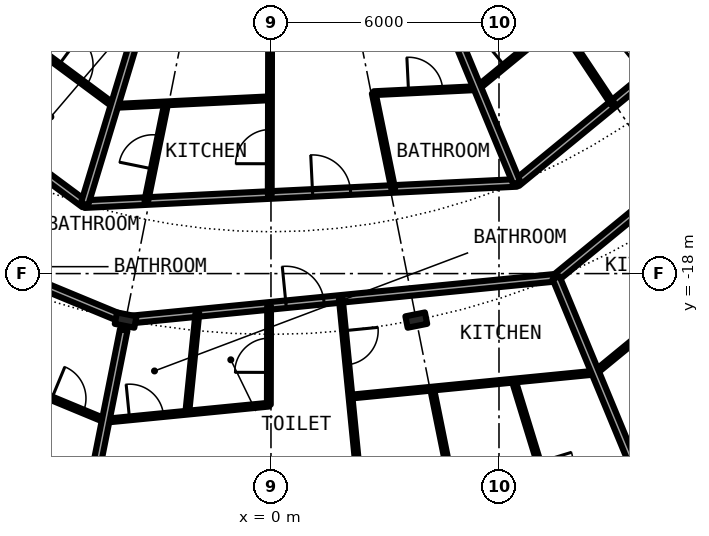
"""IFC4 building model, lengths in metres.
Left out: names, types, materials, properties, quantities, classifications, styles, units other than length and angle.
Written with IfcOpenShell. Run it as: python <this file> out.ifc"""

import sys

from ifc_helpers import new_model, si_unit, direction, frame, frame_2d, origin, origin_2d, place, context, subcontext, project, spatial, rectangle, i_section, extrude, element, fill, save


model = new_model("IFC4")
c1 = context("Model", 3, precision=1e-05, world=origin(), true_north=direction((0.0, 1.0)))
c2 = subcontext(c1, "Body", "Model", "MODEL_VIEW")
j1 = project(units=[si_unit("LENGTHUNIT", "METRE"), si_unit("PLANEANGLEUNIT", "RADIAN")], contexts=[c1])
p1 = place(None, origin())
s1 = spatial("IfcSite", under=j1, at=p1, CompositionType="ELEMENT")
p2 = place(p1, origin())
s2 = spatial("IfcBuilding", under=s1, at=p2, CompositionType="ELEMENT")
p3 = place(p2, frame((0.0, 0.0, 63.6)))
s3 = spatial("IfcBuildingStorey", under=s2, at=p3, CompositionType="ELEMENT", Elevation=63.6)
for number, where, z_axis, x_axis in (
    (1, (-3.824, -19.223, 0.0), (0.0, 0.0, 1.0), (-0.195, -0.981, 0.0)),
    (2, (3.824, -19.223, 0.0), (0.0, 0.0, 1.0), (0.195, -0.981, 0.0)),
):
    element("IfcColumn", number, at=place(p3, frame(where, z_axis=z_axis, x_axis=x_axis)), inside=s3, PredefinedType="COLUMN", context=c2, shape_type="SweptSolid", body=[
        extrude(i_section(OverallWidth=0.306, OverallDepth=0.524, WebThickness=0.021, FlangeThickness=0.04, FilletRadius=0.027, at=origin_2d()), origin(), (0.0, 0.0, 1.0), 3.05),
    ])
p4 = place(p3, frame((-8.376, -20.204, 0.0), z_axis=(0.0, 0.0, 1.0), x_axis=(0.92378218199, -0.382918372814, 0.0)))
e3 = element("IfcWall", 3, at=p4, inside=s3, PredefinedType="PARTITIONING", context=c2, shape_type="SweptSolid", body=[
    extrude(rectangle(XDim=4.364, YDim=0.1, at=frame_2d((2.182, 0.0))), origin(), (0.0, 0.0, 1.0), 2.7),
])
p5 = place(p4, frame((2.823, 0.0, 0.0)))
e4 = element("IfcOpeningElement", 4, at=p5, cuts=e3, PredefinedType="OPENING", context=c2, shape_type="SweptSolid", body=[
    extrude(rectangle(XDim=0.9, YDim=2.3, at=frame_2d((0.45, 1.15))), frame((0.0, 0.06, 0.0), z_axis=(0.0, -1.0, 0.0), x_axis=(1.0, 0.0, 0.0)), (0.0, 0.0, 1.0), 0.12),
])
p6 = place(p3, frame((-4.36, -21.872, 0.0), z_axis=(0.0, 0.0, 1.0), x_axis=(0.995203449084, 0.097826862012, 0.0)))
e5 = element("IfcWall", 5, at=p6, inside=s3, PredefinedType="PARTITIONING", context=c2, shape_type="SweptSolid", body=[
    extrude(rectangle(XDim=4.325, YDim=0.1, at=frame_2d((2.163, 0.0))), origin(), (0.0, 0.0, 1.0), 2.7),
])
p7 = place(p6, frame((0.64, 0.0, 0.0)))
e6 = element("IfcOpeningElement", 6, at=p7, cuts=e5, PredefinedType="OPENING", context=c2, shape_type="SweptSolid", body=[
    extrude(rectangle(XDim=0.9, YDim=2.3, at=frame_2d((0.45, 1.15))), frame((0.0, 0.06, 0.0), z_axis=(0.0, -1.0, 0.0), x_axis=(1.0, 0.0, 0.0)), (0.0, 0.0, 1.0), 0.12),
])
p8 = place(p3, frame((2.089, -21.238, 0.0), z_axis=(0.0, 0.0, 1.0), x_axis=(0.995211787668, 0.097741995509, 0.0)))
e7 = element("IfcWall", 7, at=p8, inside=s3, PredefinedType="PARTITIONING", context=c2, shape_type="SweptSolid", body=[
    extrude(rectangle(XDim=6.477, YDim=0.1, at=frame_2d((3.238, 0.0))), origin(), (0.0, 0.0, 1.0), 2.7),
])
p9 = place(p3, frame((8.534, -20.603, 0.0), z_axis=(0.0, 0.0, 1.0), x_axis=(0.773000340237, 0.634405606843, 0.0)))
e8 = element("IfcWall", 8, at=p9, inside=s3, PredefinedType="PARTITIONING", context=c2, shape_type="SweptSolid", body=[
    extrude(rectangle(XDim=6.474, YDim=0.1, at=frame_2d((3.237, 0.0))), origin(), (0.0, 0.0, 1.0), 2.7),
])
p10 = place(p3, frame((-10.745, -16.356, 0.0), z_axis=(0.0, 0.0, 1.0), x_axis=(0.923881347896, -0.382679049609, 0.0)))
e9 = element("IfcWall", 9, at=p10, inside=s3, PredefinedType="PARTITIONING", context=c2, shape_type="SweptSolid", body=[
    extrude(rectangle(XDim=7.335, YDim=0.2, at=frame_2d((3.668, 0.0))), origin(), (0.0, 0.0, 1.0), 2.38),
])
p11 = place(p10, frame((4.124, 0.0, 0.0)))
e10 = element("IfcOpeningElement", 10, at=p11, cuts=e9, PredefinedType="OPENING", context=c2, shape_type="SweptSolid", body=[
    extrude(rectangle(XDim=1.0, YDim=2.3, at=frame_2d((0.5, 1.15))), frame((0.0, 0.11, 0.0), z_axis=(0.0, -1.0, 0.0), x_axis=(1.0, 0.0, 0.0)), (0.0, 0.0, 1.0), 0.22),
])
p12 = place(p3, frame((-3.665, -19.207, 0.0), z_axis=(0.0, 0.0, 1.0), x_axis=(0.995190249661, 0.097961048277, 0.0)))
e11 = element("IfcWall", 11, at=p12, inside=s3, PredefinedType="PARTITIONING", context=c2, shape_type="SweptSolid", body=[
    extrude(rectangle(XDim=11.22, YDim=0.2, at=frame_2d((5.61, 0.0))), origin(), (0.0, 0.0, 1.0), 2.38),
])
p13 = place(p12, frame((4.08, 0.0, 0.0)))
e12 = element("IfcOpeningElement", 12, at=p13, cuts=e11, PredefinedType="OPENING", context=c2, shape_type="SweptSolid", body=[
    extrude(rectangle(XDim=1.0, YDim=2.3, at=frame_2d((0.5, 1.15))), frame((0.0, 0.11, 0.0), z_axis=(0.0, -1.0, 0.0), x_axis=(1.0, 0.0, 0.0)), (0.0, 0.0, 1.0), 0.22),
])
p14 = place(p3, frame((7.498, -18.109, 0.0), z_axis=(0.0, 0.0, 1.0), x_axis=(0.773076379635, 0.634312944256, 0.0)))
e13 = element("IfcWall", 13, at=p14, inside=s3, PredefinedType="PARTITIONING", context=c2, shape_type="SweptSolid", body=[
    extrude(rectangle(XDim=11.221, YDim=0.2, at=frame_2d((5.611, 0.0))), origin(), (0.0, 0.0, 1.0), 2.38),
])
p15 = place(p14, frame((6.132, 0.0, 0.0)))
e14 = element("IfcOpeningElement", 14, at=p15, cuts=e13, PredefinedType="OPENING", context=c2, shape_type="SweptSolid", body=[
    extrude(rectangle(XDim=1.0, YDim=2.3, at=frame_2d((0.5, 1.15))), frame((0.0, 0.11, 0.0), z_axis=(0.0, -1.0, 0.0), x_axis=(1.0, 0.0, 0.0)), (0.0, 0.0, 1.0), 0.22),
])
p16 = place(p3, frame((6.467, -15.614, 0.0), z_axis=(0.0, 0.0, 1.0), x_axis=(0.773074935257, 0.634314704605, 0.0)))
e15 = element("IfcWall", 15, at=p16, inside=s3, PredefinedType="PARTITIONING", context=c2, shape_type="SweptSolid", body=[
    extrude(rectangle(XDim=9.809, YDim=0.2, at=frame_2d((4.904, 0.0))), origin(), (0.0, 0.0, 1.0), 2.7),
])
p17 = place(p16, frame((4.407, 0.0, 0.0)))
e16 = element("IfcOpeningElement", 16, at=p17, cuts=e15, PredefinedType="OPENING", context=c2, shape_type="SweptSolid", body=[
    extrude(rectangle(XDim=1.0, YDim=2.3, at=frame_2d((0.5, 1.15))), frame((0.0, 0.11, 0.0), z_axis=(0.0, -1.0, 0.0), x_axis=(1.0, 0.0, 0.0)), (0.0, 0.0, 1.0), 0.22),
])
p18 = place(p3, frame((-12.745, -10.358, 0.0), z_axis=(0.0, 0.0, 1.0), x_axis=(0.803191461888, -0.595720971219, 0.0)))
e17 = element("IfcWall", 17, at=p18, inside=s3, PredefinedType="PARTITIONING", context=c2, shape_type="SweptSolid", body=[
    extrude(rectangle(XDim=9.76, YDim=0.2, at=frame_2d((4.88, 0.0))), origin(), (0.0, 0.0, 1.0), 2.7),
])
p19 = place(p18, frame((4.38, 0.0, 0.0)))
e18 = element("IfcOpeningElement", 18, at=p19, cuts=e17, PredefinedType="OPENING", context=c2, shape_type="SweptSolid", body=[
    extrude(rectangle(XDim=1.0, YDim=2.3, at=frame_2d((0.5, 1.15))), frame((0.0, 0.11, 0.0), z_axis=(0.0, -1.0, 0.0), x_axis=(1.0, 0.0, 0.0)), (0.0, 0.0, 1.0), 0.22),
])
p20 = place(p3, frame((-4.909, -16.172, 0.0), z_axis=(0.0, 0.0, 1.0), x_axis=(0.99879913765, 0.048992679355, 0.0)))
e19 = element("IfcWall", 19, at=p20, inside=s3, PredefinedType="PARTITIONING", context=c2, shape_type="SweptSolid", body=[
    extrude(rectangle(XDim=11.392, YDim=0.2, at=frame_2d((5.696, 0.0))), origin(), (0.0, 0.0, 1.0), 2.7),
])
p21 = place(p20, frame((6.011, 0.0, 0.0)))
e20 = element("IfcOpeningElement", 20, at=p21, cuts=e19, PredefinedType="OPENING", context=c2, shape_type="SweptSolid", body=[
    extrude(rectangle(XDim=1.0, YDim=2.3, at=frame_2d((0.5, 1.15))), frame((0.0, 0.11, 0.0), z_axis=(0.0, -1.0, 0.0), x_axis=(1.0, 0.0, 0.0)), (0.0, 0.0, 1.0), 0.22),
])
p22 = place(p3, frame((5.434, -13.119, 0.0), z_axis=(0.0, 0.0, 1.0), x_axis=(0.773049907698, 0.634345205868, 0.0)))
e21 = element("IfcWall", 21, at=p22, inside=s3, PredefinedType="PARTITIONING", context=c2, shape_type="SweptSolid", body=[
    extrude(rectangle(XDim=2.748, YDim=0.1, at=frame_2d((1.374, 0.0))), origin(), (0.0, 0.0, 1.0), 2.7),
])
p23 = place(p22, frame((0.924, 0.0, 0.0)))
e22 = element("IfcOpeningElement", 22, at=p23, cuts=e21, PredefinedType="OPENING", context=c2, shape_type="SweptSolid", body=[
    extrude(rectangle(XDim=0.9, YDim=2.3, at=frame_2d((0.45, 1.15))), frame((0.0, 0.06, 0.0), z_axis=(0.0, -1.0, 0.0), x_axis=(1.0, 0.0, 0.0)), (0.0, 0.0, 1.0), 0.12),
])
p24 = place(p3, frame((-6.319, -11.96, 0.0), z_axis=(0.0, 0.0, 1.0), x_axis=(0.803128348509, -0.595806055542, 0.0)))
e23 = element("IfcWall", 23, at=p24, inside=s3, PredefinedType="PARTITIONING", context=c2, shape_type="SweptSolid", body=[
    extrude(rectangle(XDim=2.734, YDim=0.1, at=frame_2d((1.367, 0.0))), origin(), (0.0, 0.0, 1.0), 2.7),
])
p25 = place(p24, frame((0.918, 0.0, 0.0)))
e24 = element("IfcOpeningElement", 24, at=p25, cuts=e23, PredefinedType="OPENING", context=c2, shape_type="SweptSolid", body=[
    extrude(rectangle(XDim=0.9, YDim=2.3, at=frame_2d((0.45, 1.15))), frame((0.0, 0.06, 0.0), z_axis=(0.0, -1.0, 0.0), x_axis=(1.0, 0.0, 0.0)), (0.0, 0.0, 1.0), 0.12),
])
p26 = place(p3, frame((-4.132, -13.589, 0.0), z_axis=(0.0, 0.0, 1.0), x_axis=(0.998789681748, 0.049185075323, 0.0)))
e25 = element("IfcWall", 25, at=p26, inside=s3, PredefinedType="PARTITIONING", context=c2, shape_type="SweptSolid", body=[
    extrude(rectangle(XDim=4.11, YDim=0.1, at=frame_2d((2.055, 0.0))), origin(), (0.0, 0.0, 1.0), 2.7),
])
p27 = place(p3, frame((2.704, -13.253, 0.0), z_axis=(0.0, 0.0, 1.0), x_axis=(0.998796928508, 0.049037695739, 0.0)))
e26 = element("IfcWall", 26, at=p27, inside=s3, PredefinedType="PARTITIONING", context=c2, shape_type="SweptSolid", body=[
    extrude(rectangle(XDim=2.733, YDim=0.1, at=frame_2d((1.367, 0.0))), origin(), (0.0, 0.0, 1.0), 2.7),
])
p28 = place(p27, frame((0.917, 0.0, 0.0)))
e27 = element("IfcOpeningElement", 27, at=p28, cuts=e26, PredefinedType="OPENING", context=c2, shape_type="SweptSolid", body=[
    extrude(rectangle(XDim=0.9, YDim=2.3, at=frame_2d((0.45, 1.15))), frame((0.0, 0.06, 0.0), z_axis=(0.0, -1.0, 0.0), x_axis=(1.0, 0.0, 0.0)), (0.0, 0.0, 1.0), 0.12),
])
p29 = place(p3, frame((1.838, -18.666, 0.0), z_axis=(0.0, 0.0, 1.0), x_axis=(0.098366640075, -0.995150241984, 0.0)))
e28 = element("IfcWall", 28, at=p29, inside=s3, PredefinedType="PARTITIONING", context=c2, shape_type="SweptSolid", body=[
    extrude(rectangle(XDim=8.419, YDim=0.1, at=frame_2d((4.209, 0.0))), origin(), (0.0, 0.0, 1.0), 2.7),
])
p30 = place(p29, frame((0.842, 0.0, 0.0)))
e29 = element("IfcOpeningElement", 29, at=p30, cuts=e28, PredefinedType="OPENING", context=c2, shape_type="SweptSolid", body=[
    extrude(rectangle(XDim=0.9, YDim=2.3, at=frame_2d((0.45, 1.15))), frame((0.0, 0.06, 0.0), z_axis=(0.0, -1.0, 0.0), x_axis=(1.0, 0.0, 0.0)), (0.0, 0.0, 1.0), 0.12),
])
p31 = place(p29, frame((5.051, 0.0, 0.0)))
e30 = element("IfcOpeningElement", 30, at=p31, cuts=e28, PredefinedType="OPENING", context=c2, shape_type="SweptSolid", body=[
    extrude(rectangle(XDim=0.9, YDim=2.3, at=frame_2d((0.45, 1.15))), frame((0.0, 0.06, 0.0), z_axis=(0.0, -1.0, 0.0), x_axis=(1.0, 0.0, 0.0)), (0.0, 0.0, 1.0), 0.12),
])
p32 = place(p3, frame((-10.132, -12.296, 0.0), z_axis=(0.0, 0.0, 1.0), x_axis=(0.636105207978, 0.771602335652, 0.0)))
e31 = element("IfcWall", 31, at=p32, inside=s3, PredefinedType="PARTITIONING", context=c2, shape_type="SweptSolid", body=[
    extrude(rectangle(XDim=8.213, YDim=0.1, at=frame_2d((4.106, 0.0))), origin(), (0.0, 0.0, 1.0), 2.7),
])
p33 = place(p32, frame((0.821, 0.0, 0.0)))
e32 = element("IfcOpeningElement", 32, at=p33, cuts=e31, PredefinedType="OPENING", context=c2, shape_type="SweptSolid", body=[
    extrude(rectangle(XDim=0.9, YDim=2.3, at=frame_2d((0.45, 1.15))), frame((0.0, 0.06, 0.0), z_axis=(0.0, -1.0, 0.0), x_axis=(1.0, 0.0, 0.0)), (0.0, 0.0, 1.0), 0.12),
])
p34 = place(p32, frame((4.929, 0.0, 0.0)))
e33 = element("IfcOpeningElement", 33, at=p34, cuts=e31, PredefinedType="OPENING", context=c2, shape_type="SweptSolid", body=[
    extrude(rectangle(XDim=0.9, YDim=2.3, at=frame_2d((0.45, 1.15))), frame((0.0, 0.06, 0.0), z_axis=(0.0, -1.0, 0.0), x_axis=(1.0, 0.0, 0.0)), (0.0, 0.0, 1.0), 0.12),
])
p35 = place(p3, frame((-5.302, -26.653, 0.0), z_axis=(0.0, 0.0, 1.0), x_axis=(0.195114589291, 0.98078045303, 0.0)))
e34 = element("IfcWall", 34, at=p35, inside=s3, PredefinedType="PARTITIONING", context=c2, shape_type="SweptSolid", body=[
    extrude(rectangle(XDim=7.314, YDim=0.2, at=frame_2d((3.657, 0.0))), origin(), (0.0, 0.0, 1.0), 2.7),
])
p36 = place(p3, frame((-4.906, -16.172, 0.0), z_axis=(0.0, 0.0, 1.0), x_axis=(0.290420725025, 0.956899055531, 0.0)))
e35 = element("IfcWall", 35, at=p36, inside=s3, PredefinedType="PARTITIONING", context=c2, shape_type="SweptSolid", body=[
    extrude(rectangle(XDim=9.18, YDim=0.2, at=frame_2d((4.59, 0.0))), origin(), (0.0, 0.0, 1.0), 2.7),
])
p37 = place(p3, frame((-3.281, -16.092, 0.0), z_axis=(0.0, 0.0, 1.0), x_axis=(0.199675621436, 0.979862054681, 0.0)))
e36 = element("IfcWall", 36, at=p37, inside=s3, PredefinedType="PARTITIONING", context=c2, shape_type="SweptSolid", body=[
    extrude(rectangle(XDim=2.624, YDim=0.1, at=frame_2d((1.312, 0.0))), origin(), (0.0, 0.0, 1.0), 2.7),
])
p38 = place(p37, frame((0.862, 0.0, 0.0)))
e37 = element("IfcOpeningElement", 37, at=p38, cuts=e36, PredefinedType="OPENING", context=c2, shape_type="SweptSolid", body=[
    extrude(rectangle(XDim=0.9, YDim=2.3, at=frame_2d((0.45, 1.15))), frame((0.0, 0.06, 0.0), z_axis=(0.0, -1.0, 0.0), x_axis=(1.0, 0.0, 0.0)), (0.0, 0.0, 1.0), 0.12),
])
p39 = place(p3, frame((-2.203, -21.66, 0.0), z_axis=(0.0, 0.0, 1.0), x_axis=(0.101218154182, 0.994864254692, 0.0)))
e38 = element("IfcWall", 38, at=p39, inside=s3, PredefinedType="PARTITIONING", context=c2, shape_type="SweptSolid", body=[
    extrude(rectangle(XDim=2.636, YDim=0.1, at=frame_2d((1.318, 0.0))), origin(), (0.0, 0.0, 1.0), 2.7),
])
p40 = place(p3, frame((-0.056, -21.449, 0.0), z_axis=(0.0, 0.0, 1.0), x_axis=(0.002632312023, 0.999996535461, 0.0)))
e39 = element("IfcWall", 39, at=p40, inside=s3, PredefinedType="PARTITIONING", context=c2, shape_type="SweptSolid", body=[
    extrude(rectangle(XDim=2.597, YDim=0.1, at=frame_2d((1.298, 0.0))), origin(), (0.0, 0.0, 1.0), 2.7),
])
p41 = place(p40, frame((0.849, 0.0, 0.0)))
e40 = element("IfcOpeningElement", 40, at=p41, cuts=e39, PredefinedType="OPENING", context=c2, shape_type="SweptSolid", body=[
    extrude(rectangle(XDim=0.9, YDim=2.3, at=frame_2d((0.45, 1.15))), frame((0.0, 0.06, 0.0), z_axis=(0.0, -1.0, 0.0), x_axis=(1.0, 0.0, 0.0)), (0.0, 0.0, 1.0), 0.12),
])
p42 = place(p3, frame((-0.032, -15.933, 0.0), z_axis=(0.0, 0.0, 1.0), x_axis=(0.002080789764, 0.999997835155, 0.0)))
e41 = element("IfcWall", 41, at=p42, inside=s3, PredefinedType="PARTITIONING", context=c2, shape_type="SweptSolid", body=[
    extrude(rectangle(XDim=8.213, YDim=0.1, at=frame_2d((4.106, 0.0))), origin(), (0.0, 0.0, 1.0), 2.7),
])
p43 = place(p42, frame((0.823, 0.0, 0.0)))
e42 = element("IfcOpeningElement", 42, at=p43, cuts=e41, PredefinedType="OPENING", context=c2, shape_type="SweptSolid", body=[
    extrude(rectangle(XDim=0.9, YDim=2.3, at=frame_2d((0.45, 1.15))), frame((0.0, 0.06, 0.0), z_axis=(0.0, -1.0, 0.0), x_axis=(1.0, 0.0, 0.0)), (0.0, 0.0, 1.0), 0.12),
])
p44 = place(p42, frame((4.93, 0.0, 0.0)))
e43 = element("IfcOpeningElement", 43, at=p44, cuts=e41, PredefinedType="OPENING", context=c2, shape_type="SweptSolid", body=[
    extrude(rectangle(XDim=0.9, YDim=2.3, at=frame_2d((0.45, 1.15))), frame((0.0, 0.06, 0.0), z_axis=(0.0, -1.0, 0.0), x_axis=(1.0, 0.0, 0.0)), (0.0, 0.0, 1.0), 0.12),
])
p45 = place(p3, frame((2.704, -13.253, 0.0), z_axis=(0.0, 0.0, 1.0), x_axis=(0.199820523641, -0.979832515449, 0.0)))
e44 = element("IfcWall", 44, at=p45, inside=s3, PredefinedType="PARTITIONING", context=c2, shape_type="SweptSolid", body=[
    extrude(rectangle(XDim=2.572, YDim=0.1, at=frame_2d((1.286, 0.0))), origin(), (0.0, 0.0, 1.0), 2.7),
])
p46 = place(p3, frame((2.954, -7.132, 0.0), z_axis=(0.0, 0.0, 1.0), x_axis=(0.382646942224, -0.923894646378, 0.0)))
e45 = element("IfcWall", 45, at=p46, inside=s3, PredefinedType="PARTITIONING", context=c2, shape_type="SweptSolid", body=[
    extrude(rectangle(XDim=9.181, YDim=0.2, at=frame_2d((4.59, 0.0))), origin(), (0.0, 0.0, 1.0), 2.7),
])
p47 = place(p3, frame((4.239, -21.026, 0.0), z_axis=(0.0, 0.0, 1.0), x_axis=(0.197706555414, -0.980261249844, 0.0)))
e46 = element("IfcWall", 46, at=p47, inside=s3, PredefinedType="PARTITIONING", context=c2, shape_type="SweptSolid", body=[
    extrude(rectangle(XDim=5.726, YDim=0.1, at=frame_2d((2.863, 0.0))), origin(), (0.0, 0.0, 1.0), 2.7),
])
p48 = place(p47, frame((2.413, 0.0, 0.0)))
e47 = element("IfcOpeningElement", 47, at=p48, cuts=e46, PredefinedType="OPENING", context=c2, shape_type="SweptSolid", body=[
    extrude(rectangle(XDim=0.9, YDim=2.3, at=frame_2d((0.45, 1.15))), frame((0.0, 0.06, 0.0), z_axis=(0.0, -1.0, 0.0), x_axis=(1.0, 0.0, 0.0)), (0.0, 0.0, 1.0), 0.12),
])
p49 = place(p3, frame((6.386, -20.814, 0.0), z_axis=(0.0, 0.0, 1.0), x_axis=(0.293311091719, -0.956017051874, 0.0)))
e48 = element("IfcWall", 48, at=p49, inside=s3, PredefinedType="PARTITIONING", context=c2, shape_type="SweptSolid", body=[
    extrude(rectangle(XDim=5.404, YDim=0.1, at=frame_2d((2.702, 0.0))), origin(), (0.0, 0.0, 1.0), 2.7),
])
p50 = place(p49, frame((2.252, 0.0, 0.0)))
e49 = element("IfcOpeningElement", 49, at=p50, cuts=e48, PredefinedType="OPENING", context=c2, shape_type="SweptSolid", body=[
    extrude(rectangle(XDim=0.9, YDim=2.3, at=frame_2d((0.45, 1.15))), frame((0.0, 0.06, 0.0), z_axis=(0.0, -1.0, 0.0), x_axis=(1.0, 0.0, 0.0)), (0.0, 0.0, 1.0), 0.12),
])
p51 = place(p3, frame((7.501, -18.108, 0.0), z_axis=(0.0, 0.0, 1.0), x_axis=(0.382600411313, -0.923913916587, 0.0)))
e50 = element("IfcWall", 50, at=p51, inside=s3, PredefinedType="PARTITIONING", context=c2, shape_type="SweptSolid", body=[
    extrude(rectangle(XDim=7.574, YDim=0.2, at=frame_2d((3.787, 0.0))), origin(), (0.0, 0.0, 1.0), 2.7),
])
p52 = place(p3, frame((7.558, -11.376, 0.0), z_axis=(0.0, 0.0, 1.0), x_axis=(0.553615197403, -0.83277260594, 0.0)))
e51 = element("IfcWall", 51, at=p52, inside=s3, PredefinedType="PARTITIONING", context=c2, shape_type="SweptSolid", body=[
    extrude(rectangle(XDim=2.597, YDim=0.1, at=frame_2d((1.299, 0.0))), origin(), (0.0, 0.0, 1.0), 2.7),
])
p53 = place(p5, origin())
e52 = element("IfcDoor", 52, at=p53, inside=s3, OperationType="SINGLE_SWING_RIGHT", PredefinedType="DOOR", context=c2, shape_type="SweptSolid", body=[
    extrude(rectangle(XDim=0.9, YDim=2.3, at=frame_2d((0.45, 1.15))), frame((0.0, 0.025, 0.0), z_axis=(0.0, -1.0, 0.0), x_axis=(1.0, 0.0, 0.0)), (0.0, 0.0, 1.0), 0.05),
])
fill(e4, e52)
p54 = place(p13, origin())
e53 = element("IfcDoor", 53, at=p54, inside=s3, OperationType="SINGLE_SWING_LEFT", PredefinedType="DOOR", context=c2, shape_type="SweptSolid", body=[
    extrude(rectangle(XDim=1.0, YDim=2.3, at=frame_2d((0.5, 1.15))), frame((0.0, 0.025, 0.0), z_axis=(0.0, -1.0, 0.0), x_axis=(1.0, 0.0, 0.0)), (0.0, 0.0, 1.0), 0.05),
])
fill(e12, e53)
p55 = place(p7, origin())
e54 = element("IfcDoor", 54, at=p55, inside=s3, OperationType="SINGLE_SWING_LEFT", PredefinedType="DOOR", context=c2, shape_type="SweptSolid", body=[
    extrude(rectangle(XDim=0.9, YDim=2.3, at=frame_2d((0.45, 1.15))), frame((0.0, 0.025, 0.0), z_axis=(0.0, -1.0, 0.0), x_axis=(1.0, 0.0, 0.0)), (0.0, 0.0, 1.0), 0.05),
])
fill(e6, e54)
p56 = place(p41, origin())
e55 = element("IfcDoor", 55, at=p56, inside=s3, OperationType="SINGLE_SWING_RIGHT", PredefinedType="DOOR", context=c2, shape_type="SweptSolid", body=[
    extrude(rectangle(XDim=0.9, YDim=2.3, at=frame_2d((0.45, 1.15))), frame((0.0, 0.025, 0.0), z_axis=(0.0, -1.0, 0.0), x_axis=(1.0, 0.0, 0.0)), (0.0, 0.0, 1.0), 0.05),
])
fill(e40, e55)
p57 = place(p30, origin())
e56 = element("IfcDoor", 56, at=p57, inside=s3, OperationType="SINGLE_SWING_LEFT", PredefinedType="DOOR", context=c2, shape_type="SweptSolid", body=[
    extrude(rectangle(XDim=0.9, YDim=2.3, at=frame_2d((0.45, 1.15))), frame((0.0, 0.025, 0.0), z_axis=(0.0, -1.0, 0.0), x_axis=(1.0, 0.0, 0.0)), (0.0, 0.0, 1.0), 0.05),
])
fill(e29, e56)
p58 = place(p25, origin())
e57 = element("IfcDoor", 57, at=p58, inside=s3, OperationType="SINGLE_SWING_RIGHT", PredefinedType="DOOR", context=c2, shape_type="SweptSolid", body=[
    extrude(rectangle(XDim=0.9, YDim=2.3, at=frame_2d((0.45, 1.15))), frame((0.0, 0.025, 0.0), z_axis=(0.0, -1.0, 0.0), x_axis=(1.0, 0.0, 0.0)), (0.0, 0.0, 1.0), 0.05),
])
fill(e24, e57)
p59 = place(p21, origin())
e58 = element("IfcDoor", 58, at=p59, inside=s3, OperationType="SINGLE_SWING_RIGHT", PredefinedType="DOOR", context=c2, shape_type="SweptSolid", body=[
    extrude(rectangle(XDim=1.0, YDim=2.3, at=frame_2d((0.5, 1.15))), frame((0.0, 0.025, 0.0), z_axis=(0.0, -1.0, 0.0), x_axis=(1.0, 0.0, 0.0)), (0.0, 0.0, 1.0), 0.05),
])
fill(e20, e58)
p60 = place(p28, origin())
e59 = element("IfcDoor", 59, at=p60, inside=s3, OperationType="SINGLE_SWING_RIGHT", PredefinedType="DOOR", context=c2, shape_type="SweptSolid", body=[
    extrude(rectangle(XDim=0.9, YDim=2.3, at=frame_2d((0.45, 1.15))), frame((0.0, 0.025, 0.0), z_axis=(0.0, -1.0, 0.0), x_axis=(1.0, 0.0, 0.0)), (0.0, 0.0, 1.0), 0.05),
])
fill(e27, e59)
p61 = place(p43, origin())
e60 = element("IfcDoor", 60, at=p61, inside=s3, OperationType="SINGLE_SWING_LEFT", PredefinedType="DOOR", context=c2, shape_type="SweptSolid", body=[
    extrude(rectangle(XDim=0.9, YDim=2.3, at=frame_2d((0.45, 1.15))), frame((0.0, 0.025, 0.0), z_axis=(0.0, -1.0, 0.0), x_axis=(1.0, 0.0, 0.0)), (0.0, 0.0, 1.0), 0.05),
])
fill(e42, e60)
p62 = place(p38, origin())
e61 = element("IfcDoor", 61, at=p62, inside=s3, OperationType="SINGLE_SWING_LEFT", PredefinedType="DOOR", context=c2, shape_type="SweptSolid", body=[
    extrude(rectangle(XDim=0.9, YDim=2.3, at=frame_2d((0.45, 1.15))), frame((0.0, 0.025, 0.0), z_axis=(0.0, -1.0, 0.0), x_axis=(1.0, 0.0, 0.0)), (0.0, 0.0, 1.0), 0.05),
])
fill(e37, e61)
p63 = place(p23, origin())
e62 = element("IfcDoor", 62, at=p63, inside=s3, OperationType="SINGLE_SWING_RIGHT", PredefinedType="DOOR", context=c2, shape_type="SweptSolid", body=[
    extrude(rectangle(XDim=0.9, YDim=2.3, at=frame_2d((0.45, 1.15))), frame((0.0, 0.025, 0.0), z_axis=(0.0, -1.0, 0.0), x_axis=(1.0, 0.0, 0.0)), (0.0, 0.0, 1.0), 0.05),
])
fill(e22, e62)
save(model, sys.argv[1])
